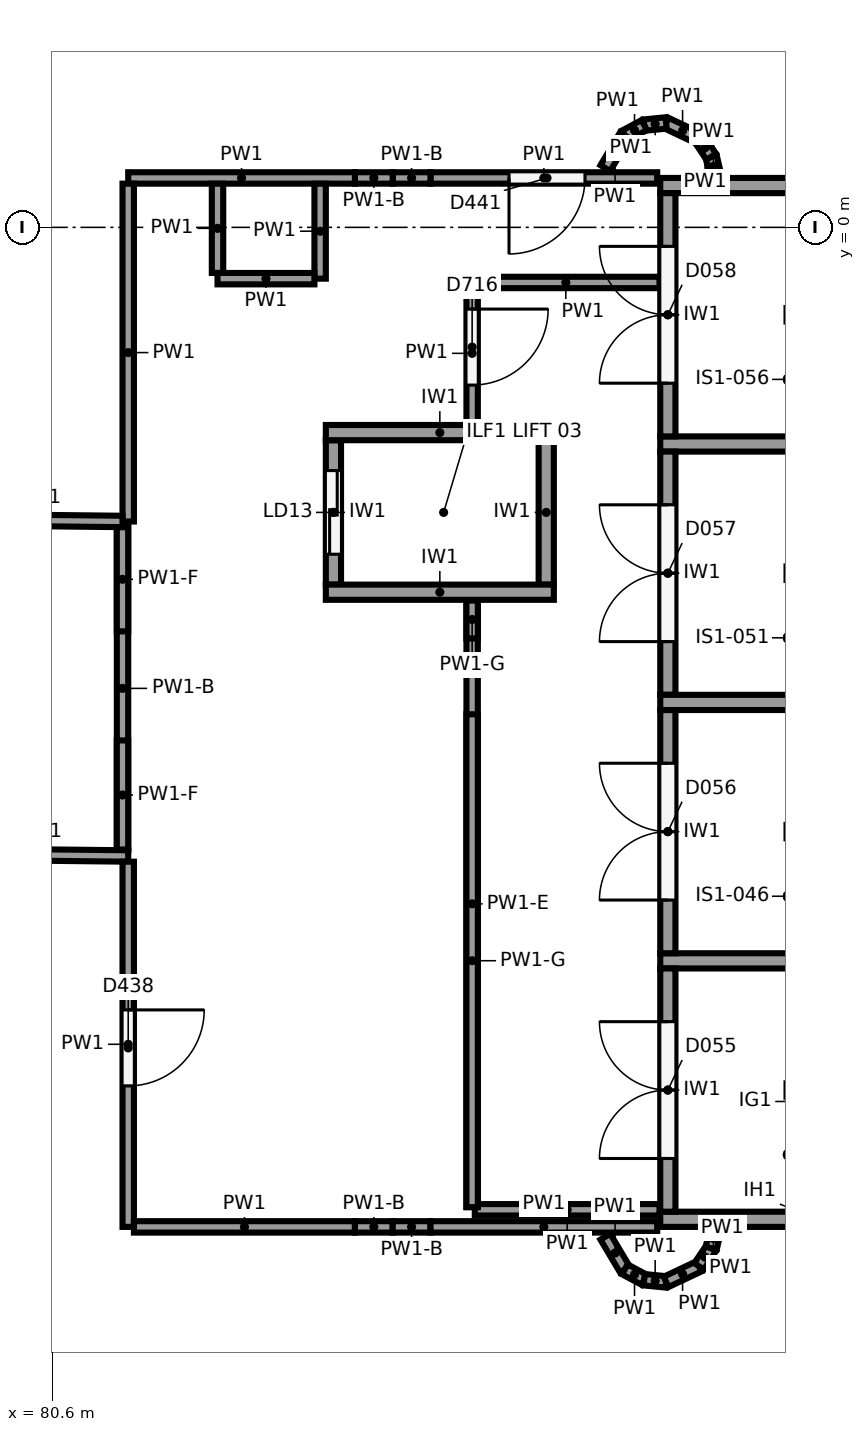
"""IFC4 building model, lengths in metres.
Left out: names, types, materials, properties, quantities, classifications, styles, units other than length and angle.
Written with IfcOpenShell. Run it as: python <this file> out.ifc"""

import sys

from ifc_helpers import new_model, si_unit, direction, frame, frame_2d, origin, origin_2d, place, context, subcontext, project, spatial, rectangle, circle, extrude, element, fill, save


model = new_model("IFC4")
c1 = context("Model", 3, precision=1e-05, world=origin(), true_north=direction((0.0, 1.0)))
c2 = subcontext(c1, "Body", "Model", "MODEL_VIEW")
j1 = project(units=[si_unit("LENGTHUNIT", "METRE"), si_unit("PLANEANGLEUNIT", "RADIAN")], contexts=[c1])
p1 = place(None, origin())
s1 = spatial("IfcSite", under=j1, at=p1, CompositionType="ELEMENT")
p2 = place(p1, origin())
s2 = spatial("IfcBuilding", under=s1, at=p2, CompositionType="ELEMENT")
p3 = place(p2, frame((0.0, 0.0, -4.0)))
s3 = spatial("IfcBuildingStorey", under=s2, at=p3, CompositionType="ELEMENT", Elevation=-4.0)
p4 = place(p3, frame((84.998, -6.081, -1.2), z_axis=(0.0, 0.0, 1.0), x_axis=(1.0, 0.0, 0.0)))
e1 = element("IfcColumn", 1, at=p4, inside=s3, PredefinedType="COLUMN", context=c2, shape_type="SweptSolid", body=[
    extrude(circle(Radius=0.6, at=origin_2d()), origin(), (0.0, 0.0, 1.0), 5.2),
])
for number, where, z_axis, x_axis in (
    (2, (97.6, -13.05, -1.2), (0.0, 0.0, 1.0), (-1.0, 0.0, 0.0)),
    (3, (97.6, -6.25, -1.2), (0.0, 0.0, 1.0), (-1.0, 0.0, 0.0)),
    (4, (97.6, 0.55, -1.2), (0.0, 0.0, 1.0), (-1.0, 0.0, 0.0)),
    (5, (97.6, -9.65, -1.2), (0.0, 0.0, 1.0), (-1.0, 0.0, 0.0)),
    (6, (97.6, -2.85, -1.2), (0.0, 0.0, 1.0), (-1.0, 0.0, 0.0)),
):
    element("IfcWall", number, at=place(p3, frame(where, z_axis=z_axis, x_axis=x_axis)), inside=s3, PredefinedType="SHEAR", context=c2, shape_type="SweptSolid", body=[
        extrude(rectangle(XDim=9.0, YDim=0.2, at=frame_2d((4.5, 0.0))), origin(), (0.0, 0.0, 1.0), 4.8),
    ])
p5 = place(p3, frame((88.7, -12.95, -1.2), z_axis=(0.0, 0.0, 1.0), x_axis=(0.0, 1.0, 0.0)))
e7 = element("IfcWall", 7, at=p5, inside=s3, PredefinedType="SHEAR", context=c2, shape_type="SweptSolid", body=[
    extrude(rectangle(XDim=3.2, YDim=0.2, at=frame_2d((1.6, 0.0))), origin(), (0.0, 0.0, 1.0), 4.8),
])
p6 = place(p5, frame((0.7, 0.0, 1.2)))
e8 = element("IfcOpeningElement", 8, at=p6, cuts=e7, PredefinedType="OPENING", context=c2, shape_type="SweptSolid", body=[
    extrude(rectangle(XDim=1.8, YDim=2.1, at=frame_2d((0.9, 1.05))), frame((0.0, 0.11, 0.0), z_axis=(0.0, -1.0, 0.0), x_axis=(1.0, 0.0, 0.0)), (0.0, 0.0, 1.0), 0.22),
])
p7 = place(p3, frame((88.7, -9.55, -1.2), z_axis=(0.0, 0.0, 1.0), x_axis=(0.0, 1.0, 0.0)))
e9 = element("IfcWall", 9, at=p7, inside=s3, PredefinedType="SHEAR", context=c2, shape_type="SweptSolid", body=[
    extrude(rectangle(XDim=3.2, YDim=0.2, at=frame_2d((1.6, 0.0))), origin(), (0.0, 0.0, 1.0), 4.8),
])
p8 = place(p7, frame((0.7, 0.0, 1.2)))
e10 = element("IfcOpeningElement", 10, at=p8, cuts=e9, PredefinedType="OPENING", context=c2, shape_type="SweptSolid", body=[
    extrude(rectangle(XDim=1.8, YDim=2.1, at=frame_2d((0.9, 1.05))), frame((0.0, 0.11, 0.0), z_axis=(0.0, -1.0, 0.0), x_axis=(1.0, 0.0, 0.0)), (0.0, 0.0, 1.0), 0.22),
])
p9 = place(p3, frame((88.7, -6.15, -1.2), z_axis=(0.0, 0.0, 1.0), x_axis=(0.0, 1.0, 0.0)))
e11 = element("IfcWall", 11, at=p9, inside=s3, PredefinedType="SHEAR", context=c2, shape_type="SweptSolid", body=[
    extrude(rectangle(XDim=3.2, YDim=0.2, at=frame_2d((1.6, 0.0))), origin(), (0.0, 0.0, 1.0), 4.8),
])
p10 = place(p9, frame((0.7, 0.0, 1.2)))
e12 = element("IfcOpeningElement", 12, at=p10, cuts=e11, PredefinedType="OPENING", context=c2, shape_type="SweptSolid", body=[
    extrude(rectangle(XDim=1.8, YDim=2.1, at=frame_2d((0.9, 1.05))), frame((0.0, 0.11, 0.0), z_axis=(0.0, -1.0, 0.0), x_axis=(1.0, 0.0, 0.0)), (0.0, 0.0, 1.0), 0.22),
])
p11 = place(p3, frame((88.7, -2.75, -1.2), z_axis=(0.0, 0.0, 1.0), x_axis=(0.0, 1.0, 0.0)))
e13 = element("IfcWall", 13, at=p11, inside=s3, PredefinedType="SHEAR", context=c2, shape_type="SweptSolid", body=[
    extrude(rectangle(XDim=3.2, YDim=0.2, at=frame_2d((1.6, 0.0))), origin(), (0.0, 0.0, 1.0), 4.8),
])
p12 = place(p11, frame((0.7, 0.0, 1.2)))
e14 = element("IfcOpeningElement", 14, at=p12, cuts=e13, PredefinedType="OPENING", context=c2, shape_type="SweptSolid", body=[
    extrude(rectangle(XDim=1.8, YDim=2.1, at=frame_2d((0.9, 1.05))), frame((0.0, 0.11, 0.0), z_axis=(0.0, -1.0, 0.0), x_axis=(1.0, 0.0, 0.0)), (0.0, 0.0, 1.0), 0.22),
])
for number, where, z_axis, x_axis in (
    (15, (87.2, -4.8, -1.2), (0.0, 0.0, 1.0), (-1.0, 0.0, 0.0)),
    (16, (87.2, -2.7, -1.2), (0.0, 0.0, 1.0), (-1.0, 0.0, 0.0)),
):
    element("IfcWall", number, at=place(p3, frame(where, z_axis=z_axis, x_axis=x_axis)), inside=s3, PredefinedType="SHEAR", context=c2, shape_type="SweptSolid", body=[
        extrude(rectangle(XDim=3.0, YDim=0.2, at=frame_2d((1.5, 0.0))), origin(), (0.0, 0.0, 1.0), 4.8),
    ])
p13 = place(p3, frame((87.1, -4.7, -1.2), z_axis=(0.0, 0.0, 1.0), x_axis=(0.0, 1.0, 0.0)))
e17 = element("IfcWall", 17, at=p13, inside=s3, PredefinedType="SHEAR", context=c2, shape_type="SweptSolid", body=[
    extrude(rectangle(XDim=1.9, YDim=0.2, at=frame_2d((0.95, 0.0))), origin(), (0.0, 0.0, 1.0), 4.8),
])
p14 = place(p3, frame((84.3, -4.7, -1.2), z_axis=(0.0, 0.0, 1.0), x_axis=(0.0, 1.0, 0.0)))
e18 = element("IfcWall", 18, at=p14, inside=s3, PredefinedType="SHEAR", context=c2, shape_type="SweptSolid", body=[
    extrude(rectangle(XDim=1.9, YDim=0.2, at=frame_2d((0.95, 0.0))), origin(), (0.0, 0.0, 1.0), 4.8),
])
p15 = place(p14, frame((0.4, 0.0, 1.2)))
e19 = element("IfcOpeningElement", 19, at=p15, cuts=e18, PredefinedType="OPENING", context=c2, shape_type="SweptSolid", body=[
    extrude(rectangle(XDim=1.1, YDim=2.1, at=frame_2d((0.55, 1.05))), frame((0.0, 0.11, 0.0), z_axis=(0.0, -1.0, 0.0), x_axis=(1.0, 0.0, 0.0)), (0.0, 0.0, 1.0), 0.22),
])
p16 = place(p3, frame((79.274, -8.245, 0.0), z_axis=(0.0, 0.0, 1.0), x_axis=(0.999940447056, -0.010913401878, 0.0)))
e20 = element("IfcWall", 20, at=p16, inside=s3, PredefinedType="PARTITIONING", context=c2, shape_type="SweptSolid", body=[
    extrude(rectangle(XDim=2.327, YDim=0.15, at=frame_2d((1.163, 0.0))), origin(), (0.0, 0.0, 1.0), 3.6),
])
p17 = place(p3, frame((81.6, -8.345, 0.0), z_axis=(0.0, 0.0, 1.0), x_axis=(0.0, -1.0, 0.0)))
e21 = element("IfcWall", 21, at=p17, inside=s3, PredefinedType="PARTITIONING", context=c2, shape_type="SweptSolid", body=[
    extrude(rectangle(XDim=4.805, YDim=0.15, at=frame_2d((2.402, 0.0))), origin(), (0.0, 0.0, 1.0), 3.6),
])
p18 = place(p17, frame((1.95, 0.0, 0.0)))
e22 = element("IfcOpeningElement", 22, at=p18, cuts=e21, PredefinedType="OPENING", context=c2, shape_type="SweptSolid", body=[
    extrude(rectangle(XDim=1.0, YDim=2.1, at=frame_2d((0.5, 1.05))), frame((0.0, 0.085, 0.0), z_axis=(0.0, -1.0, 0.0), x_axis=(1.0, 0.0, 0.0)), (0.0, 0.0, 1.0), 0.17),
])
p19 = place(p3, frame((81.675, -13.15, 0.0), z_axis=(0.0, 0.0, 1.0), x_axis=(1.0, 0.0, 0.0)))
e23 = element("IfcWall", 23, at=p19, inside=s3, PredefinedType="PARTITIONING", context=c2, shape_type="SweptSolid", body=[
    extrude(rectangle(XDim=2.908, YDim=0.15, at=frame_2d((1.454, 0.0))), origin(), (0.0, 0.0, 1.0), 3.6),
])
for number, where, z_axis, x_axis in (
    (24, (84.583, -13.15, 0.0), (0.0, 0.0, 1.0), (1.0, 0.0, 0.0)),
    (25, (85.08, -13.15, 0.0), (0.0, 0.0, 1.0), (1.0, 0.0, 0.0)),
):
    element("IfcWall", number, at=place(p3, frame(where, z_axis=z_axis, x_axis=x_axis)), inside=s3, PredefinedType="PARTITIONING", context=c2, shape_type="SweptSolid", body=[
        extrude(rectangle(XDim=0.497, YDim=0.15, at=frame_2d((0.249, 0.0))), origin(), (0.0, 0.0, 1.0), 2.5),
    ])
p20 = place(p3, frame((85.577, -13.15, 0.0), z_axis=(0.0, 0.0, 1.0), x_axis=(1.0, 0.0, 0.0)))
e26 = element("IfcWall", 26, at=p20, inside=s3, PredefinedType="PARTITIONING", context=c2, shape_type="SweptSolid", body=[
    extrude(rectangle(XDim=2.983, YDim=0.15, at=frame_2d((1.491, 0.0))), origin(), (0.0, 0.0, 1.0), 3.6),
])
p21 = place(p3, frame((88.56, 0.65, 0.0), z_axis=(0.0, 0.0, 1.0), x_axis=(-1.0, 0.0, 0.0)))
e27 = element("IfcWall", 27, at=p21, inside=s3, PredefinedType="PARTITIONING", context=c2, shape_type="SweptSolid", body=[
    extrude(rectangle(XDim=2.983, YDim=0.15, at=frame_2d((1.491, 0.0))), origin(), (0.0, 0.0, 1.0), 3.6),
])
p22 = place(p21, frame((0.95, 0.0, 0.0)))
e28 = element("IfcOpeningElement", 28, at=p22, cuts=e27, PredefinedType="OPENING", context=c2, shape_type="SweptSolid", body=[
    extrude(rectangle(XDim=1.0, YDim=2.1, at=frame_2d((0.5, 1.05))), frame((0.0, 0.085, 0.0), z_axis=(0.0, -1.0, 0.0), x_axis=(1.0, 0.0, 0.0)), (0.0, 0.0, 1.0), 0.17),
])
for number, where, z_axis, x_axis in (
    (29, (85.577, 0.65, 0.0), (0.0, 0.0, 1.0), (-1.0, 0.0, 0.0)),
    (30, (85.08, 0.65, 0.0), (0.0, 0.0, 1.0), (-1.0, 0.0, 0.0)),
):
    element("IfcWall", number, at=place(p3, frame(where, z_axis=z_axis, x_axis=x_axis)), inside=s3, PredefinedType="PARTITIONING", context=c2, shape_type="SweptSolid", body=[
        extrude(rectangle(XDim=0.497, YDim=0.15, at=frame_2d((0.249, 0.0))), origin(), (0.0, 0.0, 1.0), 2.5),
    ])
p23 = place(p3, frame((84.583, 0.65, 0.0), z_axis=(0.0, 0.0, 1.0), x_axis=(-1.0, 0.0, 0.0)))
e31 = element("IfcWall", 31, at=p23, inside=s3, PredefinedType="PARTITIONING", context=c2, shape_type="SweptSolid", body=[
    extrude(rectangle(XDim=2.983, YDim=0.15, at=frame_2d((1.491, 0.0))), origin(), (0.0, 0.0, 1.0), 3.6),
])
p24 = place(p3, frame((81.6, 0.575, 0.0), z_axis=(0.0, 0.0, 1.0), x_axis=(0.0, -1.0, 0.0)))
e32 = element("IfcWall", 32, at=p24, inside=s3, PredefinedType="PARTITIONING", context=c2, shape_type="SweptSolid", body=[
    extrude(rectangle(XDim=4.445, YDim=0.15, at=frame_2d((2.223, 0.0))), origin(), (0.0, 0.0, 1.0), 3.6),
])
p25 = place(p3, frame((81.525, -3.869, 0.0), z_axis=(0.0, 0.0, 1.0), x_axis=(-0.999941036186, 0.010859288735, 0.0)))
e33 = element("IfcWall", 33, at=p25, inside=s3, PredefinedType="PARTITIONING", context=c2, shape_type="SweptSolid", body=[
    extrude(rectangle(XDim=2.203, YDim=0.15, at=frame_2d((1.102, 0.0))), origin(), (0.0, 0.0, 1.0), 3.6),
])
p26 = place(p3, frame((84.125, -0.675, 0.0), z_axis=(0.0, 0.0, 1.0), x_axis=(0.0, 1.0, 0.0)))
e34 = element("IfcWall", 34, at=p26, inside=s3, PredefinedType="PARTITIONING", context=c2, shape_type="SweptSolid", body=[
    extrude(rectangle(XDim=1.249, YDim=0.15, at=frame_2d((0.625, 0.0))), origin(), (0.0, 0.0, 1.0), 3.6),
])
p27 = place(p3, frame((82.775, 0.574, 0.0), z_axis=(0.0, 0.0, 1.0), x_axis=(0.0, -1.0, 0.0)))
e35 = element("IfcWall", 35, at=p27, inside=s3, PredefinedType="PARTITIONING", context=c2, shape_type="SweptSolid", body=[
    extrude(rectangle(XDim=1.174, YDim=0.15, at=frame_2d((0.587, 0.0))), origin(), (0.0, 0.0, 1.0), 3.6),
])
p28 = place(p3, frame((82.775, -0.675, 0.0), z_axis=(0.0, 0.0, 1.0), x_axis=(1.0, 0.0, 0.0)))
e36 = element("IfcWall", 36, at=p28, inside=s3, PredefinedType="PARTITIONING", context=c2, shape_type="SweptSolid", body=[
    extrude(rectangle(XDim=1.275, YDim=0.15, at=frame_2d((0.638, 0.0))), origin(), (0.0, 0.0, 1.0), 3.6),
])
p29 = place(p3, frame((86.16, -12.925, 0.0), z_axis=(0.0, 0.0, 1.0), x_axis=(1.0, 0.0, 0.0)))
e37 = element("IfcWall", 37, at=p29, inside=s3, PredefinedType="PARTITIONING", context=c2, shape_type="SweptSolid", body=[
    extrude(rectangle(XDim=2.43, YDim=0.15, at=frame_2d((1.215, 0.0))), origin(), (0.0, 0.0, 1.0), 3.6),
])
p30 = place(p3, frame((88.59, -0.725, 0.0), z_axis=(0.0, 0.0, 1.0), x_axis=(-1.0, 0.0, 0.0)))
e38 = element("IfcWall", 38, at=p30, inside=s3, PredefinedType="PARTITIONING", context=c2, shape_type="SweptSolid", body=[
    extrude(rectangle(XDim=2.465, YDim=0.15, at=frame_2d((1.232, 0.0))), origin(), (0.0, 0.0, 1.0), 3.6),
])
p31 = place(p3, frame((86.125, -0.725, 0.0), z_axis=(0.0, 0.0, 1.0), x_axis=(0.0, -1.0, 0.0)))
e39 = element("IfcWall", 39, at=p31, inside=s3, PredefinedType="PARTITIONING", context=c2, shape_type="SweptSolid", body=[
    extrude(rectangle(XDim=1.865, YDim=0.15, at=frame_2d((0.933, 0.0))), origin(), (0.0, 0.0, 1.0), 3.6),
])
p32 = place(p31, frame((0.35, 0.0, 0.0)))
e40 = element("IfcOpeningElement", 40, at=p32, cuts=e39, PredefinedType="OPENING", context=c2, shape_type="SweptSolid", body=[
    extrude(rectangle(XDim=1.0, YDim=2.1, at=frame_2d((0.5, 1.05))), frame((0.0, 0.085, 0.0), z_axis=(0.0, -1.0, 0.0), x_axis=(1.0, 0.0, 0.0)), (0.0, 0.0, 1.0), 0.17),
])
p33 = place(p3, frame((86.125, -4.91, 0.0), z_axis=(0.0, 0.0, 1.0), x_axis=(0.0, -1.0, 0.0)))
e41 = element("IfcWall", 41, at=p33, inside=s3, PredefinedType="PARTITIONING", context=c2, shape_type="SweptSolid", body=[
    extrude(rectangle(XDim=7.98, YDim=0.15, at=frame_2d((3.99, 0.0))), origin(), (0.0, 0.0, 1.0), 2.85),
])
p34 = place(p3, frame((86.125, -4.91, 2.85), z_axis=(0.0, 0.0, 1.0), x_axis=(0.0, -1.0, 0.0)))
e42 = element("IfcWall", 42, at=p34, inside=s3, PredefinedType="PARTITIONING", context=c2, shape_type="SweptSolid", body=[
    extrude(rectangle(XDim=0.499, YDim=0.15, at=frame_2d((0.25, 0.0))), origin(), (0.0, 0.0, 1.0), 0.75),
])
p35 = place(p3, frame((86.125, -6.406, 2.85), z_axis=(0.0, 0.0, 1.0), x_axis=(0.0, -1.0, 0.0)))
e43 = element("IfcWall", 43, at=p35, inside=s3, PredefinedType="PARTITIONING", context=c2, shape_type="SweptSolid", body=[
    extrude(rectangle(XDim=6.484, YDim=0.15, at=frame_2d((3.242, 0.0))), origin(), (0.0, 0.0, 1.0), 0.75),
])
p36 = place(p3, frame((81.525, -3.945, 0.0), z_axis=(0.0, 0.0, 1.0), x_axis=(0.0, -1.0, 0.0)))
e44 = element("IfcWall", 44, at=p36, inside=s3, PredefinedType="PARTITIONING", context=c2, shape_type="SweptSolid", body=[
    extrude(rectangle(XDim=4.24, YDim=0.15, at=frame_2d((2.12, 0.0))), origin(), (0.0, 0.0, 1.0), 2.5),
])
p37 = place(p3, frame((81.525, -3.945, 2.5), z_axis=(0.0, 0.0, 1.0), x_axis=(0.0, -1.0, 0.0)))
e45 = element("IfcWall", 45, at=p37, inside=s3, PredefinedType="PARTITIONING", context=c2, shape_type="SweptSolid", body=[
    extrude(rectangle(XDim=1.37, YDim=0.15, at=frame_2d((0.685, 0.0))), origin(), (0.0, 0.0, 1.0), 1.1),
])
p38 = place(p3, frame((81.525, -6.75, 2.5), z_axis=(0.0, 0.0, 1.0), x_axis=(0.0, -1.0, 0.0)))
e46 = element("IfcWall", 46, at=p38, inside=s3, PredefinedType="PARTITIONING", context=c2, shape_type="SweptSolid", body=[
    extrude(rectangle(XDim=1.435, YDim=0.15, at=frame_2d((0.718, 0.0))), origin(), (0.0, 0.0, 1.0), 1.1),
])
p39 = place(p3, frame((87.877, -13.279, 0.0), z_axis=(0.0, 0.0, 1.0), x_axis=(0.513060623194, -0.858352373404, 0.0)))
e47 = element("IfcWall", 47, at=p39, inside=s3, PredefinedType="PARTITIONING", context=c2, shape_type="SweptSolid", body=[
    extrude(rectangle(XDim=0.5, YDim=0.15, at=frame_2d((0.25, 0.0))), origin(), (0.0, 0.0, 1.0), 3.6),
])
for number, where, z_axis, x_axis in (
    (48, (88.134, -13.709, 0.0), (0.0, 0.0, 1.0), (0.882, -0.472, 0.0)),
    (49, (88.389, -13.845, 0.0), (0.0, 0.0, 1.0), (0.995, -0.098, 0.0)),
):
    element("IfcWall", number, at=place(p3, frame(where, z_axis=z_axis, x_axis=x_axis)), inside=s3, PredefinedType="PARTITIONING", context=c2, shape_type="SweptSolid", body=[
        extrude(rectangle(XDim=0.289, YDim=0.15, at=frame_2d((0.145, 0.0))), origin(), (0.0, 0.0, 1.0), 3.6),
    ])
p40 = place(p3, frame((88.677, -13.874, 0.0), z_axis=(0.0, 0.0, 1.0), x_axis=(0.90398642908, 0.427561148889, 0.0)))
e50 = element("IfcWall", 50, at=p40, inside=s3, PredefinedType="PARTITIONING", context=c2, shape_type="SweptSolid", body=[
    extrude(rectangle(XDim=0.48, YDim=0.15, at=frame_2d((0.24, 0.0))), origin(), (0.0, 0.0, 1.0), 3.6),
])
p41 = place(p3, frame((89.111, -13.668, 0.0), z_axis=(0.0, 0.0, 1.0), x_axis=(0.555678694372, 0.831397130511, 0.0)))
e51 = element("IfcWall", 51, at=p41, inside=s3, PredefinedType="PARTITIONING", context=c2, shape_type="SweptSolid", body=[
    extrude(rectangle(XDim=0.288, YDim=0.15, at=frame_2d((0.144, 0.0))), origin(), (0.0, 0.0, 1.0), 3.6),
])
for number, where, z_axis, x_axis in (
    (52, (89.271, -13.429, 0.0), (0.0, 0.0, 1.0), (0.23, 0.973, 0.0)),
    (53, (89.33, 0.678, 0.0), (0.0, 0.0, 1.0), (-0.23, 0.973, 0.0)),
):
    element("IfcWall", number, at=place(p3, frame(where, z_axis=z_axis, x_axis=x_axis)), inside=s3, PredefinedType="PARTITIONING", context=c2, shape_type="SweptSolid", body=[
        extrude(rectangle(XDim=0.258, YDim=0.15, at=frame_2d((0.129, 0.0))), origin(), (0.0, 0.0, 1.0), 3.6),
    ])
p42 = place(p3, frame((89.271, 0.929, 0.0), z_axis=(0.0, 0.0, 1.0), x_axis=(-0.555678694372, 0.831397130511, 0.0)))
e54 = element("IfcWall", 54, at=p42, inside=s3, PredefinedType="PARTITIONING", context=c2, shape_type="SweptSolid", body=[
    extrude(rectangle(XDim=0.288, YDim=0.15, at=frame_2d((0.144, 0.0))), origin(), (0.0, 0.0, 1.0), 3.6),
])
p43 = place(p3, frame((89.111, 1.168, 0.0), z_axis=(0.0, 0.0, 1.0), x_axis=(-0.90398642908, 0.427561148889, 0.0)))
e55 = element("IfcWall", 55, at=p43, inside=s3, PredefinedType="PARTITIONING", context=c2, shape_type="SweptSolid", body=[
    extrude(rectangle(XDim=0.48, YDim=0.15, at=frame_2d((0.24, 0.0))), origin(), (0.0, 0.0, 1.0), 3.6),
])
for number, where, z_axis, x_axis in (
    (56, (88.677, 1.374, 0.0), (0.0, 0.0, 1.0), (-0.995, -0.098, 0.0)),
    (57, (88.389, 1.345, 0.0), (0.0, 0.0, 1.0), (-0.882, -0.472, 0.0)),
):
    element("IfcWall", number, at=place(p3, frame(where, z_axis=z_axis, x_axis=x_axis)), inside=s3, PredefinedType="PARTITIONING", context=c2, shape_type="SweptSolid", body=[
        extrude(rectangle(XDim=0.289, YDim=0.15, at=frame_2d((0.145, 0.0))), origin(), (0.0, 0.0, 1.0), 3.6),
    ])
p44 = place(p3, frame((88.134, 1.209, 0.0), z_axis=(0.0, 0.0, 1.0), x_axis=(-0.513060623194, -0.858352373404, 0.0)))
e58 = element("IfcWall", 58, at=p44, inside=s3, PredefinedType="PARTITIONING", context=c2, shape_type="SweptSolid", body=[
    extrude(rectangle(XDim=0.5, YDim=0.15, at=frame_2d((0.25, 0.0))), origin(), (0.0, 0.0, 1.0), 3.6),
])
p45 = place(p6, origin())
e59 = element("IfcDoor", 59, at=p45, inside=s3, OperationType="DOUBLE_DOOR_SINGLE_SWING", PredefinedType="DOOR", context=c2, shape_type="SweptSolid", body=[
    extrude(rectangle(XDim=1.8, YDim=2.1, at=frame_2d((0.9, 1.05))), frame((0.0, 0.025, 0.0), z_axis=(0.0, -1.0, 0.0), x_axis=(1.0, 0.0, 0.0)), (0.0, 0.0, 1.0), 0.05),
])
fill(e8, e59)
p46 = place(p8, origin())
e60 = element("IfcDoor", 60, at=p46, inside=s3, OperationType="DOUBLE_DOOR_SINGLE_SWING", PredefinedType="DOOR", context=c2, shape_type="SweptSolid", body=[
    extrude(rectangle(XDim=1.8, YDim=2.1, at=frame_2d((0.9, 1.05))), frame((0.0, 0.025, 0.0), z_axis=(0.0, -1.0, 0.0), x_axis=(1.0, 0.0, 0.0)), (0.0, 0.0, 1.0), 0.05),
])
fill(e10, e60)
p47 = place(p10, origin())
e61 = element("IfcDoor", 61, at=p47, inside=s3, OperationType="DOUBLE_DOOR_SINGLE_SWING", PredefinedType="DOOR", context=c2, shape_type="SweptSolid", body=[
    extrude(rectangle(XDim=1.8, YDim=2.1, at=frame_2d((0.9, 1.05))), frame((0.0, 0.025, 0.0), z_axis=(0.0, -1.0, 0.0), x_axis=(1.0, 0.0, 0.0)), (0.0, 0.0, 1.0), 0.05),
])
fill(e12, e61)
p48 = place(p12, origin())
e62 = element("IfcDoor", 62, at=p48, inside=s3, OperationType="DOUBLE_DOOR_SINGLE_SWING", PredefinedType="DOOR", context=c2, shape_type="SweptSolid", body=[
    extrude(rectangle(XDim=1.8, YDim=2.1, at=frame_2d((0.9, 1.05))), frame((0.0, 0.025, 0.0), z_axis=(0.0, -1.0, 0.0), x_axis=(1.0, 0.0, 0.0)), (0.0, 0.0, 1.0), 0.05),
])
fill(e14, e62)
p49 = place(p15, origin())
e63 = element("IfcDoor", 63, at=p49, inside=s3, OperationType="SLIDING_TO_LEFT", PredefinedType="DOOR", context=c2, shape_type="SweptSolid", body=[
    extrude(rectangle(XDim=1.1, YDim=2.1, at=frame_2d((0.55, 1.05))), frame((0.0, 0.025, 0.0), z_axis=(0.0, -1.0, 0.0), x_axis=(1.0, 0.0, 0.0)), (0.0, 0.0, 1.0), 0.05),
])
fill(e19, e63)
p50 = place(p18, origin())
e64 = element("IfcDoor", 64, at=p50, inside=s3, OperationType="SINGLE_SWING_LEFT", PredefinedType="DOOR", context=c2, shape_type="SweptSolid", body=[
    extrude(rectangle(XDim=1.0, YDim=2.1, at=frame_2d((0.5, 1.05))), frame((0.0, 0.025, 0.0), z_axis=(0.0, -1.0, 0.0), x_axis=(1.0, 0.0, 0.0)), (0.0, 0.0, 1.0), 0.05),
])
fill(e22, e64)
p51 = place(p22, origin())
e65 = element("IfcDoor", 65, at=p51, inside=s3, OperationType="SINGLE_SWING_RIGHT", PredefinedType="DOOR", context=c2, shape_type="SweptSolid", body=[
    extrude(rectangle(XDim=1.0, YDim=2.1, at=frame_2d((0.5, 1.05))), frame((0.0, 0.025, 0.0), z_axis=(0.0, -1.0, 0.0), x_axis=(1.0, 0.0, 0.0)), (0.0, 0.0, 1.0), 0.05),
])
fill(e28, e65)
p52 = place(p32, origin())
e66 = element("IfcDoor", 66, at=p52, inside=s3, OperationType="SINGLE_SWING_LEFT", PredefinedType="DOOR", context=c2, shape_type="SweptSolid", body=[
    extrude(rectangle(XDim=1.0, YDim=2.1, at=frame_2d((0.5, 1.05))), frame((0.0, 0.025, 0.0), z_axis=(0.0, -1.0, 0.0), x_axis=(1.0, 0.0, 0.0)), (0.0, 0.0, 1.0), 0.05),
])
fill(e40, e66)
save(model, sys.argv[1])
